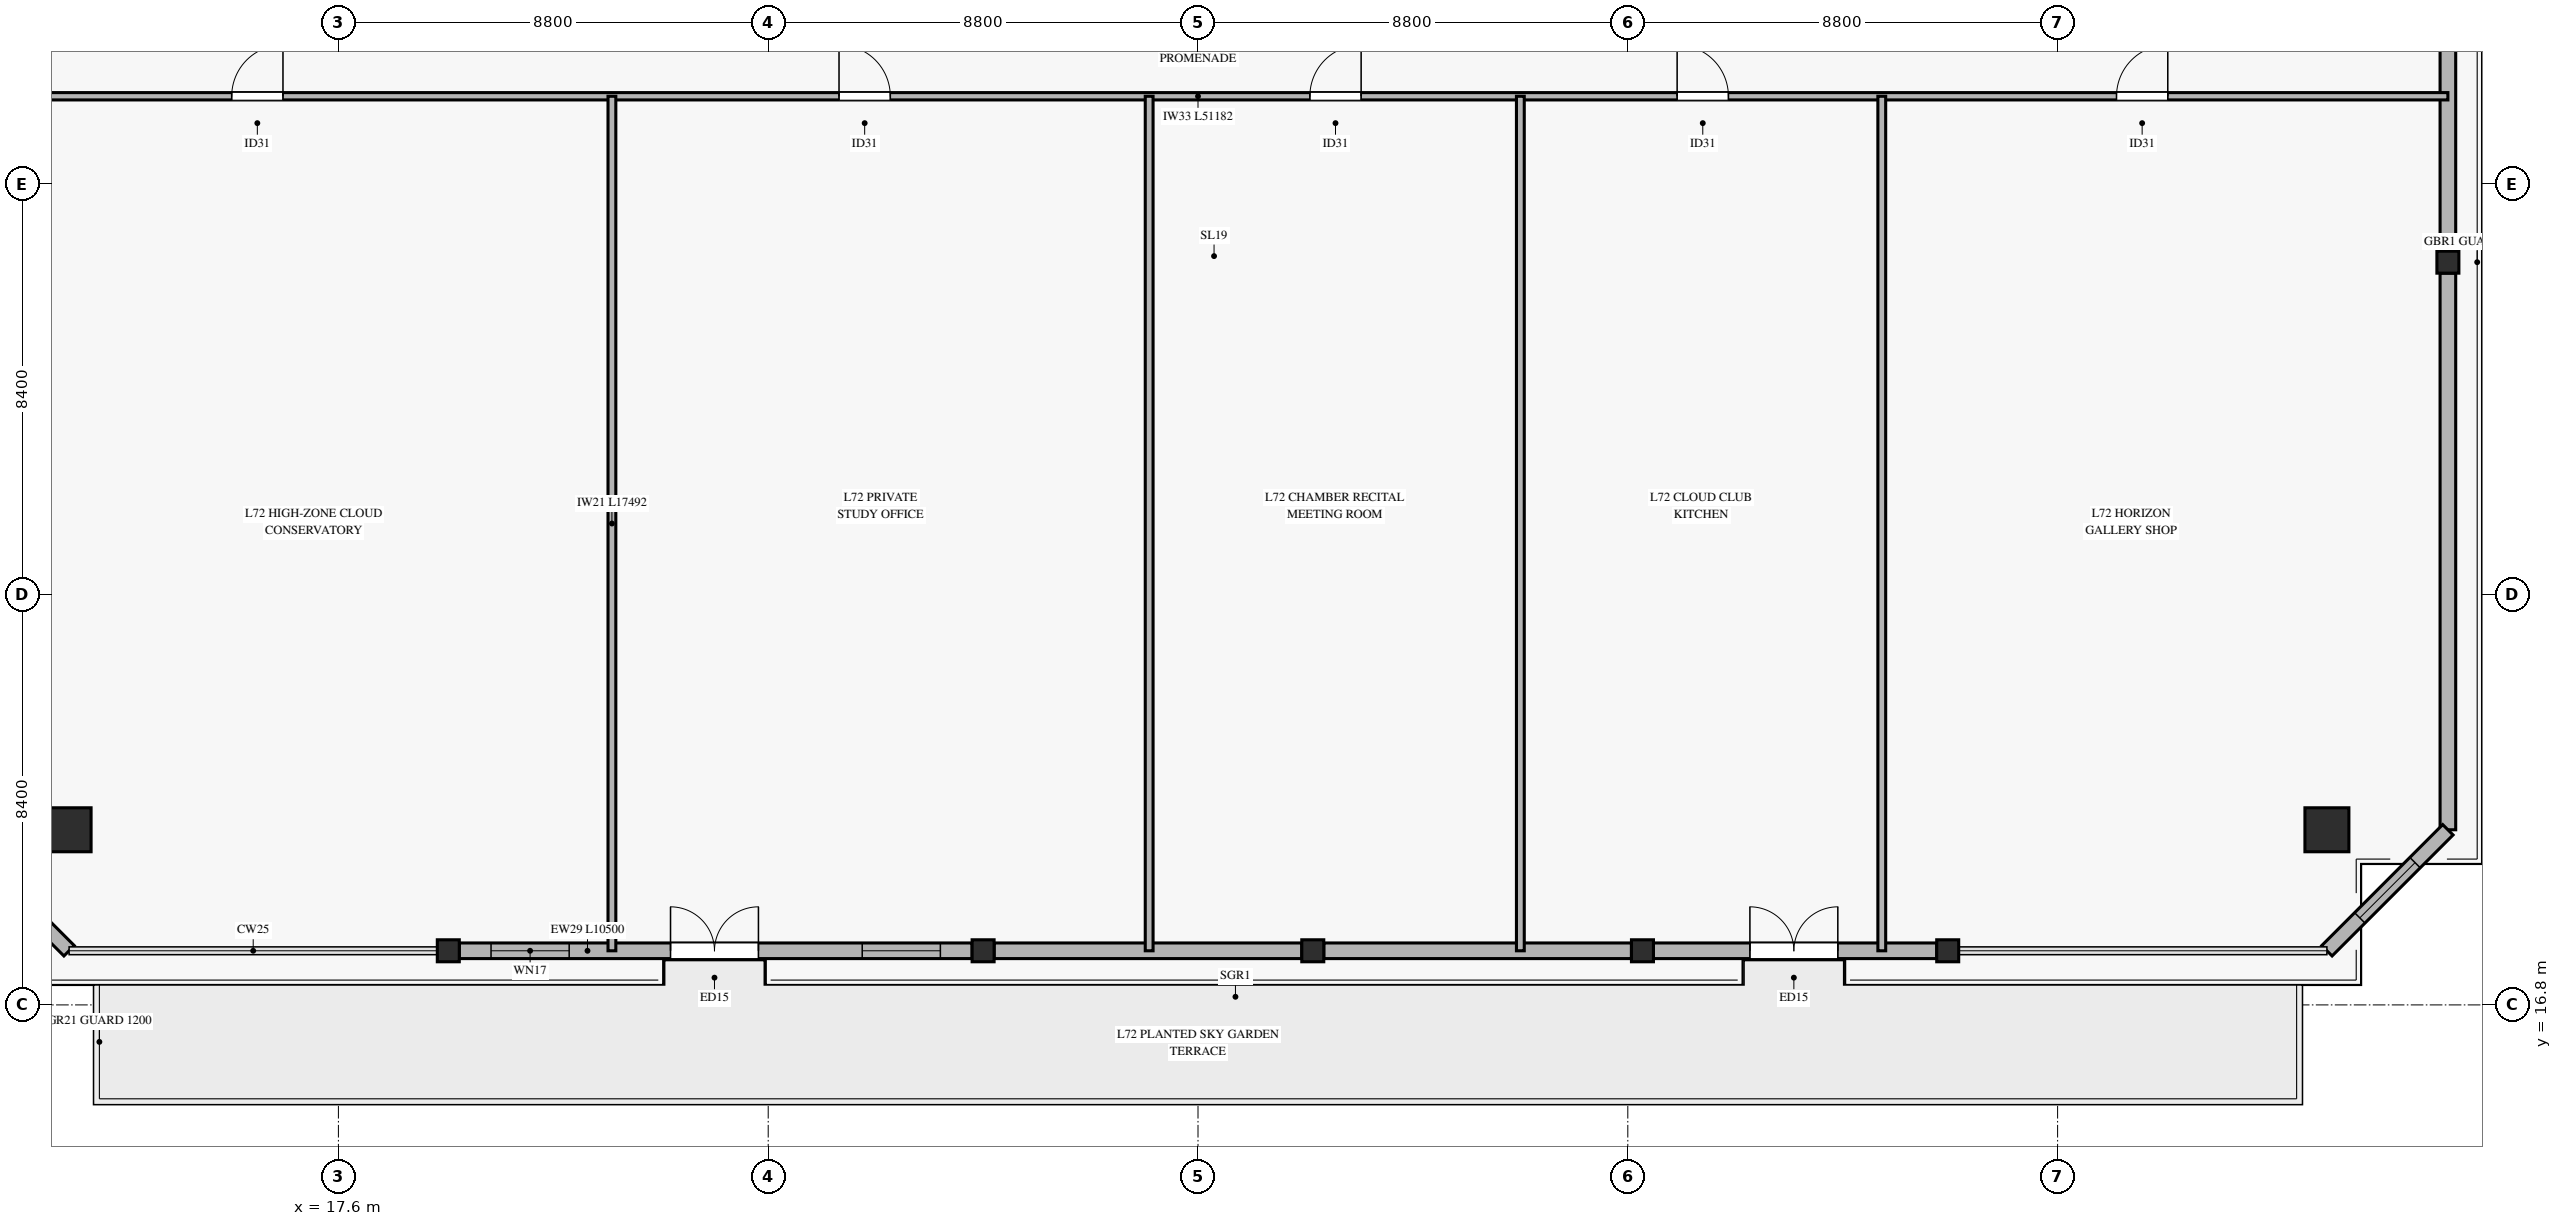
"""IFC4 building model, lengths in metres.
Left out: names, types, materials, properties, quantities, classifications, styles, units other than length and angle.
Written with IfcOpenShell. Run it as: python <this file> out.ifc"""

import sys

from ifc_helpers import new_model, si_unit, direction, frame, frame_2d, origin, origin_2d, place, context, subcontext, project, spatial, rectangle, hollow_rectangle, extrude, source, transform, mapped, element, fill, save


model = new_model("IFC4")
c1 = context("Model", 3, precision=1e-05, world=origin(), true_north=direction((0.0, 1.0)))
c2 = subcontext(c1, "Body", "Model", "MODEL_VIEW")
j1 = project(units=[si_unit("LENGTHUNIT", "METRE"), si_unit("PLANEANGLEUNIT", "RADIAN")], contexts=[c1])
p1 = place(None, origin())
s1 = spatial("IfcSite", under=j1, at=p1, CompositionType="ELEMENT")
p2 = place(p1, origin())
s2 = spatial("IfcBuilding", under=s1, at=p2, CompositionType="ELEMENT")
p3 = place(p2, frame((0.0, 0.0, 279.1)))
s3 = spatial("IfcBuildingStorey", under=s2, at=p3, CompositionType="ELEMENT", Elevation=279.1)
m1 = source(origin(), c2, "Body", "SweptSolid", [
    extrude(hollow_rectangle(XDim=0.9, YDim=0.9, WallThickness=0.04, at=origin_2d()), origin(), (0.0, 0.0, 1.0), 6.52),
])
for number, where, z_axis, x_axis in (
    (1, (12.086, 20.385, 0.0), (0.0, 0.0, 1.0), (1.0, 0.0, 0.0)),
    (2, (58.314, 20.385, 0.0), (0.0, 0.0, 1.0), (1.0, 0.0, 0.0)),
):
    element("IfcColumn", number, at=place(p3, frame(where, z_axis=z_axis, x_axis=x_axis)), inside=s3, PredefinedType="COLUMN", context=c2, shape_type="MappedRepresentation", body=[
        mapped(m1, transform((0.0, 0.0, 0.0), x_axis=(1.0, 0.0, 0.0), y_axis=(0.0, 1.0, 0.0), z_axis=(0.0, 0.0, 1.0), scale=1.0)),
    ])
m2 = source(origin(), c2, "Body", "SweptSolid", [
    extrude(hollow_rectangle(XDim=0.45, YDim=0.45, WallThickness=0.022, at=origin_2d()), origin(), (0.0, 0.0, 1.0), 6.52),
])
for number, where, z_axis, x_axis in (
    (3, (19.85, 17.908, 0.0), (0.0, 0.0, 1.0), (1.0, 0.0, 0.0)),
    (4, (30.8, 17.908, 0.0), (0.0, 0.0, 1.0), (1.0, 0.0, 0.0)),
    (5, (37.55, 17.908, 0.0), (0.0, 0.0, 1.0), (1.0, 0.0, 0.0)),
    (6, (44.3, 17.908, 0.0), (0.0, 0.0, 1.0), (1.0, 0.0, 0.0)),
    (7, (50.55, 17.908, 0.0), (0.0, 0.0, 1.0), (1.0, 0.0, 0.0)),
    (8, (60.791, 32.004, 0.0), (0.0, 0.0, 1.0), (1.0, 0.0, 0.0)),
):
    element("IfcColumn", number, at=place(p3, frame(where, z_axis=z_axis, x_axis=x_axis)), inside=s3, PredefinedType="COLUMN", context=c2, shape_type="MappedRepresentation", body=[
        mapped(m2, transform((0.0, 0.0, 0.0), x_axis=(1.0, 0.0, 0.0), y_axis=(0.0, 1.0, 0.0), z_axis=(0.0, 0.0, 1.0), scale=1.0)),
    ])
p4 = place(p3, frame((20.075, 17.908, 0.0), z_axis=(0.0, 0.0, 1.0), x_axis=(1.0, 0.0, 0.0)))
e9 = element("IfcWall", 9, at=p4, inside=s3, PredefinedType="SOLIDWALL", context=c2, shape_type="SweptSolid", body=[
    extrude(rectangle(XDim=10.5, YDim=0.32, at=frame_2d((5.25, 0.0))), origin(), (0.0, 0.0, 1.0), 6.15),
])
p5 = place(p4, frame((4.325, 0.0, 0.0)))
e10 = element("IfcOpeningElement", 10, at=p5, cuts=e9, PredefinedType="OPENING", context=c2, shape_type="SweptSolid", body=[
    extrude(rectangle(XDim=1.8, YDim=2.3, at=frame_2d((0.9, 1.15))), frame((0.0, 0.17, 0.0), z_axis=(0.0, -1.0, 0.0), x_axis=(1.0, 0.0, 0.0)), (0.0, 0.0, 1.0), 0.34),
])
p6 = place(p4, frame((0.65, 0.0, 0.45)))
e11 = element("IfcOpeningElement", 11, at=p6, cuts=e9, PredefinedType="OPENING", context=c2, shape_type="SweptSolid", body=[
    extrude(rectangle(XDim=1.6, YDim=2.0, at=frame_2d((0.8, 1.0))), frame((0.0, 0.17, 0.0), z_axis=(0.0, -1.0, 0.0), x_axis=(1.0, 0.0, 0.0)), (0.0, 0.0, 1.0), 0.34),
])
p7 = place(p4, frame((8.25, 0.0, 0.45)))
e12 = element("IfcOpeningElement", 12, at=p7, cuts=e9, PredefinedType="OPENING", context=c2, shape_type="SweptSolid", body=[
    extrude(rectangle(XDim=1.6, YDim=2.0, at=frame_2d((0.8, 1.0))), frame((0.0, 0.17, 0.0), z_axis=(0.0, -1.0, 0.0), x_axis=(1.0, 0.0, 0.0)), (0.0, 0.0, 1.0), 0.34),
])
for number, where, z_axis, x_axis in (
    (13, (31.025, 17.908, 0.0), (0.0, 0.0, 1.0), (1.0, 0.0, 0.0)),
    (14, (37.775, 17.908, 0.0), (0.0, 0.0, 1.0), (1.0, 0.0, 0.0)),
):
    element("IfcWall", number, at=place(p3, frame(where, z_axis=z_axis, x_axis=x_axis)), inside=s3, PredefinedType="SOLIDWALL", context=c2, shape_type="SweptSolid", body=[
        extrude(rectangle(XDim=6.3, YDim=0.32, at=frame_2d((3.15, 0.0))), origin(), (0.0, 0.0, 1.0), 6.15),
    ])
p8 = place(p3, frame((44.525, 17.908, 0.0), z_axis=(0.0, 0.0, 1.0), x_axis=(1.0, 0.0, 0.0)))
e15 = element("IfcWall", 15, at=p8, inside=s3, PredefinedType="SOLIDWALL", context=c2, shape_type="SweptSolid", body=[
    extrude(rectangle(XDim=5.8, YDim=0.32, at=frame_2d((2.9, 0.0))), origin(), (0.0, 0.0, 1.0), 6.15),
])
p9 = place(p8, frame((1.975, 0.0, 0.0)))
e16 = element("IfcOpeningElement", 16, at=p9, cuts=e15, PredefinedType="OPENING", context=c2, shape_type="SweptSolid", body=[
    extrude(rectangle(XDim=1.8, YDim=2.3, at=frame_2d((0.9, 1.15))), frame((0.0, 0.17, 0.0), z_axis=(0.0, -1.0, 0.0), x_axis=(1.0, 0.0, 0.0)), (0.0, 0.0, 1.0), 0.34),
])
p10 = place(p3, frame((60.791, 20.385, 0.0), z_axis=(0.0, 0.0, 1.0), x_axis=(0.0, 1.0, 0.0)))
e17 = element("IfcWall", 17, at=p10, inside=s3, PredefinedType="SOLIDWALL", context=c2, shape_type="SweptSolid", body=[
    extrude(rectangle(XDim=11.394, YDim=0.32, at=frame_2d((5.697, 0.0))), origin(), (0.0, 0.0, 1.0), 6.15),
])
p11 = place(p3, frame((60.791, 32.229, 0.0), z_axis=(0.0, 0.0, 1.0), x_axis=(0.0, 1.0, 0.0)))
e18 = element("IfcWall", 18, at=p11, inside=s3, PredefinedType="SOLIDWALL", context=c2, shape_type="SweptSolid", body=[
    extrude(rectangle(XDim=11.393, YDim=0.32, at=frame_2d((5.697, 0.0))), origin(), (0.0, 0.0, 1.0), 6.15),
])
p12 = place(p11, frame((5.626, 0.0, 0.45)))
e19 = element("IfcOpeningElement", 19, at=p12, cuts=e18, PredefinedType="OPENING", context=c2, shape_type="SweptSolid", body=[
    extrude(rectangle(XDim=2.6, YDim=2.4, at=frame_2d((1.3, 1.2))), frame((0.0, 0.17, 0.0), z_axis=(0.0, -1.0, 0.0), x_axis=(1.0, 0.0, 0.0)), (0.0, 0.0, 1.0), 0.34),
])
p13 = place(p3, frame((9.609, 20.385, 0.0), z_axis=(0.0, 0.0, 1.0), x_axis=(0.707106781187, -0.707106781187, 0.0)))
e20 = element("IfcWall", 20, at=p13, inside=s3, PredefinedType="SOLIDWALL", context=c2, shape_type="SweptSolid", body=[
    extrude(rectangle(XDim=3.503, YDim=0.3, at=frame_2d((1.751, 0.0))), origin(), (0.0, 0.0, 1.0), 6.15),
])
p14 = place(p13, frame((0.952, 0.0, 0.45)))
e21 = element("IfcOpeningElement", 21, at=p14, cuts=e20, PredefinedType="OPENING", context=c2, shape_type="SweptSolid", body=[
    extrude(rectangle(XDim=1.6, YDim=2.0, at=frame_2d((0.8, 1.0))), frame((0.0, 0.16, 0.0), z_axis=(0.0, -1.0, 0.0), x_axis=(1.0, 0.0, 0.0)), (0.0, 0.0, 1.0), 0.32),
])
p15 = place(p3, frame((58.314, 17.908, 0.0), z_axis=(0.0, 0.0, 1.0), x_axis=(0.707106781187, 0.707106781187, 0.0)))
e22 = element("IfcWall", 22, at=p15, inside=s3, PredefinedType="SOLIDWALL", context=c2, shape_type="SweptSolid", body=[
    extrude(rectangle(XDim=3.503, YDim=0.3, at=frame_2d((1.751, 0.0))), origin(), (0.0, 0.0, 1.0), 6.15),
])
p16 = place(p15, frame((0.952, 0.0, 0.45)))
e23 = element("IfcOpeningElement", 23, at=p16, cuts=e22, PredefinedType="OPENING", context=c2, shape_type="SweptSolid", body=[
    extrude(rectangle(XDim=1.6, YDim=2.0, at=frame_2d((0.8, 1.0))), frame((0.0, 0.16, 0.0), z_axis=(0.0, -1.0, 0.0), x_axis=(1.0, 0.0, 0.0)), (0.0, 0.0, 1.0), 0.32),
])
p17 = place(p3, frame((9.609, 35.4, 0.0), z_axis=(0.0, 0.0, 1.0), x_axis=(1.0, 0.0, 0.0)))
e24 = element("IfcWall", 24, at=p17, inside=s3, PredefinedType="PARTITIONING", context=c2, shape_type="SweptSolid", body=[
    extrude(rectangle(XDim=51.182, YDim=0.15, at=frame_2d((25.591, 0.0))), origin(), (0.0, 0.0, 1.0), 5.805),
])
p18 = place(p17, frame((5.806, 0.0, 0.0)))
e25 = element("IfcOpeningElement", 25, at=p18, cuts=e24, PredefinedType="OPENING", context=c2, shape_type="SweptSolid", body=[
    extrude(rectangle(XDim=1.05, YDim=2.15, at=frame_2d((0.525, 1.075))), frame((0.0, 0.085, 0.0), z_axis=(0.0, -1.0, 0.0), x_axis=(1.0, 0.0, 0.0)), (0.0, 0.0, 1.0), 0.17),
])
p19 = place(p17, frame((18.241, 0.0, 0.0)))
e26 = element("IfcOpeningElement", 26, at=p19, cuts=e24, PredefinedType="OPENING", context=c2, shape_type="SweptSolid", body=[
    extrude(rectangle(XDim=1.05, YDim=2.15, at=frame_2d((0.525, 1.075))), frame((0.0, 0.085, 0.0), z_axis=(0.0, -1.0, 0.0), x_axis=(1.0, 0.0, 0.0)), (0.0, 0.0, 1.0), 0.17),
])
p20 = place(p17, frame((27.881, 0.0, 0.0)))
e27 = element("IfcOpeningElement", 27, at=p20, cuts=e24, PredefinedType="OPENING", context=c2, shape_type="SweptSolid", body=[
    extrude(rectangle(XDim=1.05, YDim=2.15, at=frame_2d((0.525, 1.075))), frame((0.0, 0.085, 0.0), z_axis=(0.0, -1.0, 0.0), x_axis=(1.0, 0.0, 0.0)), (0.0, 0.0, 1.0), 0.17),
])
p21 = place(p17, frame((35.401, 0.0, 0.0)))
e28 = element("IfcOpeningElement", 28, at=p21, cuts=e24, PredefinedType="OPENING", context=c2, shape_type="SweptSolid", body=[
    extrude(rectangle(XDim=1.05, YDim=2.15, at=frame_2d((0.525, 1.075))), frame((0.0, 0.085, 0.0), z_axis=(0.0, -1.0, 0.0), x_axis=(1.0, 0.0, 0.0)), (0.0, 0.0, 1.0), 0.17),
])
p22 = place(p17, frame((44.397, 0.0, 0.0)))
e29 = element("IfcOpeningElement", 29, at=p22, cuts=e24, PredefinedType="OPENING", context=c2, shape_type="SweptSolid", body=[
    extrude(rectangle(XDim=1.05, YDim=2.15, at=frame_2d((0.525, 1.075))), frame((0.0, 0.085, 0.0), z_axis=(0.0, -1.0, 0.0), x_axis=(1.0, 0.0, 0.0)), (0.0, 0.0, 1.0), 0.17),
])
for number, where, z_axis, x_axis in (
    (30, (23.2, 17.908, 0.0), (0.0, 0.0, 1.0), (0.0, 1.0, 0.0)),
    (31, (34.2, 17.908, 0.0), (0.0, 0.0, 1.0), (0.0, 1.0, 0.0)),
    (32, (41.8, 17.908, 0.0), (0.0, 0.0, 1.0), (0.0, 1.0, 0.0)),
    (33, (49.2, 17.908, 0.0), (0.0, 0.0, 1.0), (0.0, 1.0, 0.0)),
):
    element("IfcWall", number, at=place(p3, frame(where, z_axis=z_axis, x_axis=x_axis)), inside=s3, PredefinedType="PARTITIONING", context=c2, shape_type="SweptSolid", body=[
        extrude(rectangle(XDim=17.492, YDim=0.16, at=frame_2d((8.746, 0.0))), origin(), (0.0, 0.0, 1.0), 6.105),
    ])
m3 = source(origin(), c2, "Body", "SweptSolid", [
    extrude(rectangle(XDim=1.8, YDim=2.3, at=frame_2d((0.9, 1.15))), frame((0.0, 0.025, 0.0), z_axis=(0.0, -1.0, 0.0), x_axis=(1.0, 0.0, 0.0)), (0.0, 0.0, 1.0), 0.05),
])
p23 = place(p5, origin())
e34 = element("IfcDoor", 34, at=p23, inside=s3, OperationType="DOUBLE_SWING_LEFT", PredefinedType="DOOR", context=c2, shape_type="MappedRepresentation", body=[
    mapped(m3, transform((0.0, 0.0, 0.0), x_axis=(1.0, 0.0, 0.0), y_axis=(0.0, 1.0, 0.0), z_axis=(0.0, 0.0, 1.0), scale=1.0)),
])
fill(e10, e34)
m4 = source(origin(), c2, "Body", "SweptSolid", [
    extrude(rectangle(XDim=1.6, YDim=2.0, at=frame_2d((0.8, 1.0))), frame((0.0, 0.03, 0.0), z_axis=(0.0, -1.0, 0.0), x_axis=(1.0, 0.0, 0.0)), (0.0, 0.0, 1.0), 0.06),
])
p24 = place(p6, origin())
e35 = element("IfcWindow", 35, at=p24, inside=s3, PartitioningType="SINGLE_PANEL", PredefinedType="WINDOW", context=c2, shape_type="MappedRepresentation", body=[
    mapped(m4, transform((0.0, 0.0, 0.0), x_axis=(1.0, 0.0, 0.0), y_axis=(0.0, 1.0, 0.0), z_axis=(0.0, 0.0, 1.0), scale=1.0)),
])
fill(e11, e35)
p25 = place(p7, origin())
e36 = element("IfcWindow", 36, at=p25, inside=s3, PartitioningType="SINGLE_PANEL", PredefinedType="WINDOW", context=c2, shape_type="MappedRepresentation", body=[
    mapped(m4, transform((0.0, 0.0, 0.0), x_axis=(1.0, 0.0, 0.0), y_axis=(0.0, 1.0, 0.0), z_axis=(0.0, 0.0, 1.0), scale=1.0)),
])
fill(e12, e36)
p26 = place(p9, origin())
e37 = element("IfcDoor", 37, at=p26, inside=s3, OperationType="DOUBLE_SWING_RIGHT", PredefinedType="DOOR", context=c2, shape_type="MappedRepresentation", body=[
    mapped(m3, transform((0.0, 0.0, 0.0), x_axis=(1.0, 0.0, 0.0), y_axis=(0.0, 1.0, 0.0), z_axis=(0.0, 0.0, 1.0), scale=1.0)),
])
fill(e16, e37)
p27 = place(p16, origin())
e38 = element("IfcWindow", 38, at=p27, inside=s3, PartitioningType="SINGLE_PANEL", PredefinedType="WINDOW", context=c2, shape_type="MappedRepresentation", body=[
    mapped(m4, transform((0.0, 0.0, 0.0), x_axis=(1.0, 0.0, 0.0), y_axis=(0.0, 1.0, 0.0), z_axis=(0.0, 0.0, 1.0), scale=1.0)),
])
fill(e23, e38)
m5 = source(origin(), c2, "Body", "SweptSolid", [
    extrude(rectangle(XDim=1.05, YDim=2.15, at=frame_2d((0.525, 1.075))), frame((0.0, 0.025, 0.0), z_axis=(0.0, -1.0, 0.0), x_axis=(1.0, 0.0, 0.0)), (0.0, 0.0, 1.0), 0.05),
])
p28 = place(p18, origin())
e39 = element("IfcDoor", 39, at=p28, inside=s3, OperationType="SINGLE_SWING_RIGHT", PredefinedType="DOOR", context=c2, shape_type="MappedRepresentation", body=[
    mapped(m5, transform((0.0, 0.0, 0.0), x_axis=(1.0, 0.0, 0.0), y_axis=(0.0, 1.0, 0.0), z_axis=(0.0, 0.0, 1.0), scale=1.0)),
])
fill(e25, e39)
p29 = place(p19, origin())
e40 = element("IfcDoor", 40, at=p29, inside=s3, OperationType="SINGLE_SWING_LEFT", PredefinedType="DOOR", context=c2, shape_type="MappedRepresentation", body=[
    mapped(m5, transform((0.0, 0.0, 0.0), x_axis=(1.0, 0.0, 0.0), y_axis=(0.0, 1.0, 0.0), z_axis=(0.0, 0.0, 1.0), scale=1.0)),
])
fill(e26, e40)
p30 = place(p20, origin())
e41 = element("IfcDoor", 41, at=p30, inside=s3, OperationType="SINGLE_SWING_RIGHT", PredefinedType="DOOR", context=c2, shape_type="MappedRepresentation", body=[
    mapped(m5, transform((0.0, 0.0, 0.0), x_axis=(1.0, 0.0, 0.0), y_axis=(0.0, 1.0, 0.0), z_axis=(0.0, 0.0, 1.0), scale=1.0)),
])
fill(e27, e41)
p31 = place(p21, origin())
e42 = element("IfcDoor", 42, at=p31, inside=s3, OperationType="SINGLE_SWING_LEFT", PredefinedType="DOOR", context=c2, shape_type="MappedRepresentation", body=[
    mapped(m5, transform((0.0, 0.0, 0.0), x_axis=(1.0, 0.0, 0.0), y_axis=(0.0, 1.0, 0.0), z_axis=(0.0, 0.0, 1.0), scale=1.0)),
])
fill(e28, e42)
p32 = place(p22, origin())
e43 = element("IfcDoor", 43, at=p32, inside=s3, OperationType="SINGLE_SWING_RIGHT", PredefinedType="DOOR", context=c2, shape_type="MappedRepresentation", body=[
    mapped(m5, transform((0.0, 0.0, 0.0), x_axis=(1.0, 0.0, 0.0), y_axis=(0.0, 1.0, 0.0), z_axis=(0.0, 0.0, 1.0), scale=1.0)),
])
fill(e29, e43)
save(model, sys.argv[1])
